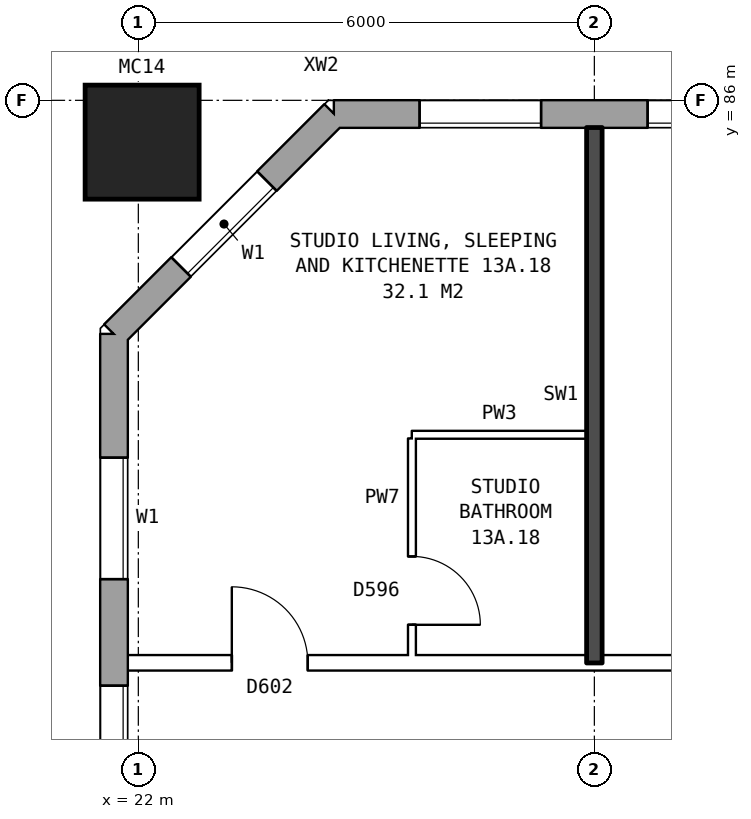
"""IFC4 building model, lengths in metres.
Left out: names, types, materials, properties, quantities, classifications, styles, units other than length and angle.
Written with IfcOpenShell. Run it as: python <this file> out.ifc"""

import sys

from ifc_helpers import new_model, si_unit, direction, frame, frame_2d, origin, origin_2d, place, context, subcontext, project, spatial, rectangle, hollow_rectangle, extrude, element, fill, save


model = new_model("IFC4")
c1 = context("Model", 3, precision=1e-05, world=origin(), true_north=direction((0.0, 1.0)))
c2 = subcontext(c1, "Body", "Model", "MODEL_VIEW")
j1 = project(units=[si_unit("LENGTHUNIT", "METRE"), si_unit("PLANEANGLEUNIT", "RADIAN")], contexts=[c1])
p1 = place(None, origin())
s1 = spatial("IfcSite", under=j1, at=p1, CompositionType="ELEMENT")
p2 = place(p1, origin())
s2 = spatial("IfcBuilding", under=s1, at=p2, CompositionType="ELEMENT")
p3 = place(p2, frame((0.0, 0.0, 50.5)))
s3 = spatial("IfcBuildingStorey", under=s2, at=p3, CompositionType="ELEMENT", Elevation=50.5)
p4 = place(p3, frame((22.05, 85.45, 0.0), z_axis=(0.0, 0.0, 1.0), x_axis=(1.0, 0.0, 0.0)))
e1 = element("IfcColumn", 1, at=p4, inside=s3, PredefinedType="COLUMN", context=c2, shape_type="SweptSolid", body=[
    extrude(hollow_rectangle(XDim=1.5, YDim=1.5, WallThickness=0.08, at=origin_2d()), origin(), (0.0, 0.0, 1.0), 3.1),
])
p5 = place(p3, frame((72.925, 85.82, 0.0), z_axis=(0.0, 0.0, 1.0), x_axis=(-1.0, 0.0, 0.0)))
e2 = element("IfcWall", 2, at=p5, inside=s3, PredefinedType="STANDARD", context=c2, shape_type="SweptSolid", body=[
    extrude(rectangle(XDim=48.351, YDim=0.36, at=frame_2d((24.175, 0.0))), origin(), (0.0, 0.0, 1.0), 2.85),
])
p6 = place(p5, frame((0.625, 0.0, 0.8)))
e3 = element("IfcOpeningElement", 3, at=p6, cuts=e2, PredefinedType="OPENING", context=c2, shape_type="SweptSolid", body=[
    extrude(rectangle(XDim=1.6, YDim=1.8, at=frame_2d((0.8, 0.9))), frame((0.0, 0.19, 0.0), z_axis=(0.0, -1.0, 0.0), x_axis=(1.0, 0.0, 0.0)), (0.0, 0.0, 1.0), 0.38),
])
p7 = place(p5, frame((3.625, 0.0, 0.8)))
e4 = element("IfcOpeningElement", 4, at=p7, cuts=e2, PredefinedType="OPENING", context=c2, shape_type="SweptSolid", body=[
    extrude(rectangle(XDim=1.6, YDim=1.8, at=frame_2d((0.8, 0.9))), frame((0.0, 0.19, 0.0), z_axis=(0.0, -1.0, 0.0), x_axis=(1.0, 0.0, 0.0)), (0.0, 0.0, 1.0), 0.38),
])
p8 = place(p5, frame((5.525, 0.0, 0.8)))
e5 = element("IfcOpeningElement", 5, at=p8, cuts=e2, PredefinedType="OPENING", context=c2, shape_type="SweptSolid", body=[
    extrude(rectangle(XDim=1.4, YDim=1.8, at=frame_2d((0.7, 0.9))), frame((0.0, 0.19, 0.0), z_axis=(0.0, -1.0, 0.0), x_axis=(1.0, 0.0, 0.0)), (0.0, 0.0, 1.0), 0.38),
])
p9 = place(p5, frame((9.225, 0.0, 0.45)))
e6 = element("IfcOpeningElement", 6, at=p9, cuts=e2, PredefinedType="OPENING", context=c2, shape_type="SweptSolid", body=[
    extrude(rectangle(XDim=1.0, YDim=0.9, at=frame_2d((0.5, 0.45))), frame((0.0, 0.19, 0.0), z_axis=(0.0, -1.0, 0.0), x_axis=(1.0, 0.0, 0.0)), (0.0, 0.0, 1.0), 0.38),
])
p10 = place(p5, frame((12.625, 0.0, 0.8)))
e7 = element("IfcOpeningElement", 7, at=p10, cuts=e2, PredefinedType="OPENING", context=c2, shape_type="SweptSolid", body=[
    extrude(rectangle(XDim=1.6, YDim=1.8, at=frame_2d((0.8, 0.9))), frame((0.0, 0.19, 0.0), z_axis=(0.0, -1.0, 0.0), x_axis=(1.0, 0.0, 0.0)), (0.0, 0.0, 1.0), 0.38),
])
p11 = place(p5, frame((15.625, 0.0, 0.8)))
e8 = element("IfcOpeningElement", 8, at=p11, cuts=e2, PredefinedType="OPENING", context=c2, shape_type="SweptSolid", body=[
    extrude(rectangle(XDim=1.6, YDim=1.8, at=frame_2d((0.8, 0.9))), frame((0.0, 0.19, 0.0), z_axis=(0.0, -1.0, 0.0), x_axis=(1.0, 0.0, 0.0)), (0.0, 0.0, 1.0), 0.38),
])
p12 = place(p5, frame((18.625, 0.0, 0.8)))
e9 = element("IfcOpeningElement", 9, at=p12, cuts=e2, PredefinedType="OPENING", context=c2, shape_type="SweptSolid", body=[
    extrude(rectangle(XDim=1.6, YDim=1.8, at=frame_2d((0.8, 0.9))), frame((0.0, 0.19, 0.0), z_axis=(0.0, -1.0, 0.0), x_axis=(1.0, 0.0, 0.0)), (0.0, 0.0, 1.0), 0.38),
])
p13 = place(p5, frame((21.625, 0.0, 0.8)))
e10 = element("IfcOpeningElement", 10, at=p13, cuts=e2, PredefinedType="OPENING", context=c2, shape_type="SweptSolid", body=[
    extrude(rectangle(XDim=1.6, YDim=1.8, at=frame_2d((0.8, 0.9))), frame((0.0, 0.19, 0.0), z_axis=(0.0, -1.0, 0.0), x_axis=(1.0, 0.0, 0.0)), (0.0, 0.0, 1.0), 0.38),
])
p14 = place(p5, frame((24.625, 0.0, 0.8)))
e11 = element("IfcOpeningElement", 11, at=p14, cuts=e2, PredefinedType="OPENING", context=c2, shape_type="SweptSolid", body=[
    extrude(rectangle(XDim=1.6, YDim=1.8, at=frame_2d((0.8, 0.9))), frame((0.0, 0.19, 0.0), z_axis=(0.0, -1.0, 0.0), x_axis=(1.0, 0.0, 0.0)), (0.0, 0.0, 1.0), 0.38),
])
p15 = place(p5, frame((27.625, 0.0, 0.8)))
e12 = element("IfcOpeningElement", 12, at=p15, cuts=e2, PredefinedType="OPENING", context=c2, shape_type="SweptSolid", body=[
    extrude(rectangle(XDim=1.6, YDim=1.8, at=frame_2d((0.8, 0.9))), frame((0.0, 0.19, 0.0), z_axis=(0.0, -1.0, 0.0), x_axis=(1.0, 0.0, 0.0)), (0.0, 0.0, 1.0), 0.38),
])
p16 = place(p5, frame((30.625, 0.0, 0.8)))
e13 = element("IfcOpeningElement", 13, at=p16, cuts=e2, PredefinedType="OPENING", context=c2, shape_type="SweptSolid", body=[
    extrude(rectangle(XDim=1.6, YDim=1.8, at=frame_2d((0.8, 0.9))), frame((0.0, 0.19, 0.0), z_axis=(0.0, -1.0, 0.0), x_axis=(1.0, 0.0, 0.0)), (0.0, 0.0, 1.0), 0.38),
])
p17 = place(p5, frame((33.625, 0.0, 0.8)))
e14 = element("IfcOpeningElement", 14, at=p17, cuts=e2, PredefinedType="OPENING", context=c2, shape_type="SweptSolid", body=[
    extrude(rectangle(XDim=1.6, YDim=1.8, at=frame_2d((0.8, 0.9))), frame((0.0, 0.19, 0.0), z_axis=(0.0, -1.0, 0.0), x_axis=(1.0, 0.0, 0.0)), (0.0, 0.0, 1.0), 0.38),
])
p18 = place(p5, frame((36.125, 0.0, 0.8)))
e15 = element("IfcOpeningElement", 15, at=p18, cuts=e2, PredefinedType="OPENING", context=c2, shape_type="SweptSolid", body=[
    extrude(rectangle(XDim=1.0, YDim=1.8, at=frame_2d((0.5, 0.9))), frame((0.0, 0.19, 0.0), z_axis=(0.0, -1.0, 0.0), x_axis=(1.0, 0.0, 0.0)), (0.0, 0.0, 1.0), 0.38),
])
p19 = place(p5, frame((39.975, 0.0, 1.7)))
e16 = element("IfcOpeningElement", 16, at=p19, cuts=e2, PredefinedType="OPENING", context=c2, shape_type="SweptSolid", body=[
    extrude(rectangle(XDim=1.0, YDim=0.9, at=frame_2d((0.5, 0.45))), frame((0.0, 0.19, 0.0), z_axis=(0.0, -1.0, 0.0), x_axis=(1.0, 0.0, 0.0)), (0.0, 0.0, 1.0), 0.38),
])
p20 = place(p5, frame((42.625, 0.0, 0.8)))
e17 = element("IfcOpeningElement", 17, at=p20, cuts=e2, PredefinedType="OPENING", context=c2, shape_type="SweptSolid", body=[
    extrude(rectangle(XDim=1.6, YDim=1.8, at=frame_2d((0.8, 0.9))), frame((0.0, 0.19, 0.0), z_axis=(0.0, -1.0, 0.0), x_axis=(1.0, 0.0, 0.0)), (0.0, 0.0, 1.0), 0.38),
])
p21 = place(p5, frame((45.625, 0.0, 0.8)))
e18 = element("IfcOpeningElement", 18, at=p21, cuts=e2, PredefinedType="OPENING", context=c2, shape_type="SweptSolid", body=[
    extrude(rectangle(XDim=1.6, YDim=1.8, at=frame_2d((0.8, 0.9))), frame((0.0, 0.19, 0.0), z_axis=(0.0, -1.0, 0.0), x_axis=(1.0, 0.0, 0.0)), (0.0, 0.0, 1.0), 0.38),
])
p22 = place(p5, frame((7.225, 0.0, 1.6)))
e19 = element("IfcOpeningElement", 19, at=p22, cuts=e2, PredefinedType="OPENING", context=c2, shape_type="SweptSolid", body=[
    extrude(rectangle(XDim=1.0, YDim=0.9, at=frame_2d((0.5, 0.45))), frame((0.0, 0.19, 0.0), z_axis=(0.0, -1.0, 0.0), x_axis=(1.0, 0.0, 0.0)), (0.0, 0.0, 1.0), 0.38),
])
p23 = place(p5, frame((10.575, 0.0, 0.45)))
e20 = element("IfcOpeningElement", 20, at=p23, cuts=e2, PredefinedType="OPENING", context=c2, shape_type="SweptSolid", body=[
    extrude(rectangle(XDim=1.2, YDim=1.8, at=frame_2d((0.6, 0.9))), frame((0.0, 0.19, 0.0), z_axis=(0.0, -1.0, 0.0), x_axis=(1.0, 0.0, 0.0)), (0.0, 0.0, 1.0), 0.38),
])
p24 = place(p5, frame((37.425, 0.0, 0.8)))
e21 = element("IfcOpeningElement", 21, at=p24, cuts=e2, PredefinedType="OPENING", context=c2, shape_type="SweptSolid", body=[
    extrude(rectangle(XDim=1.0, YDim=0.9, at=frame_2d((0.5, 0.45))), frame((0.0, 0.19, 0.0), z_axis=(0.0, -1.0, 0.0), x_axis=(1.0, 0.0, 0.0)), (0.0, 0.0, 1.0), 0.38),
])
p25 = place(p5, frame((41.275, 0.0, 0.8)))
e22 = element("IfcOpeningElement", 22, at=p25, cuts=e2, PredefinedType="OPENING", context=c2, shape_type="SweptSolid", body=[
    extrude(rectangle(XDim=1.0, YDim=1.8, at=frame_2d((0.5, 0.9))), frame((0.0, 0.19, 0.0), z_axis=(0.0, -1.0, 0.0), x_axis=(1.0, 0.0, 0.0)), (0.0, 0.0, 1.0), 0.38),
])
p26 = place(p3, frame((24.575, 85.82, 0.0), z_axis=(0.0, 0.0, 1.0), x_axis=(-0.707106781187, -0.707106781187, 0.0)))
e23 = element("IfcWall", 23, at=p26, inside=s3, PredefinedType="STANDARD", context=c2, shape_type="SweptSolid", body=[
    extrude(rectangle(XDim=4.094, YDim=0.36, at=frame_2d((2.047, 0.0))), origin(), (0.0, 0.0, 1.0), 2.85),
])
p27 = place(p26, frame((1.247, 0.0, 0.8)))
e24 = element("IfcOpeningElement", 24, at=p27, cuts=e23, PredefinedType="OPENING", context=c2, shape_type="SweptSolid", body=[
    extrude(rectangle(XDim=1.6, YDim=1.8, at=frame_2d((0.8, 0.9))), frame((0.0, 0.19, 0.0), z_axis=(0.0, -1.0, 0.0), x_axis=(1.0, 0.0, 0.0)), (0.0, 0.0, 1.0), 0.38),
])
p28 = place(p3, frame((21.68, 82.925, 0.0), z_axis=(0.0, 0.0, 1.0), x_axis=(0.0, -1.0, 0.0)))
e25 = element("IfcWall", 25, at=p28, inside=s3, PredefinedType="STANDARD", context=c2, shape_type="SweptSolid", body=[
    extrude(rectangle(XDim=25.851, YDim=0.36, at=frame_2d((12.925, 0.0))), origin(), (0.0, 0.0, 1.0), 2.85),
])
p29 = place(p28, frame((1.625, 0.0, 0.8)))
e26 = element("IfcOpeningElement", 26, at=p29, cuts=e25, PredefinedType="OPENING", context=c2, shape_type="SweptSolid", body=[
    extrude(rectangle(XDim=1.6, YDim=1.8, at=frame_2d((0.8, 0.9))), frame((0.0, 0.19, 0.0), z_axis=(0.0, -1.0, 0.0), x_axis=(1.0, 0.0, 0.0)), (0.0, 0.0, 1.0), 0.38),
])
p30 = place(p28, frame((4.625, 0.0, 0.8)))
e27 = element("IfcOpeningElement", 27, at=p30, cuts=e25, PredefinedType="OPENING", context=c2, shape_type="SweptSolid", body=[
    extrude(rectangle(XDim=1.6, YDim=1.8, at=frame_2d((0.8, 0.9))), frame((0.0, 0.19, 0.0), z_axis=(0.0, -1.0, 0.0), x_axis=(1.0, 0.0, 0.0)), (0.0, 0.0, 1.0), 0.38),
])
p31 = place(p28, frame((6.525, 0.0, 0.8)))
e28 = element("IfcOpeningElement", 28, at=p31, cuts=e25, PredefinedType="OPENING", context=c2, shape_type="SweptSolid", body=[
    extrude(rectangle(XDim=1.6, YDim=1.8, at=frame_2d((0.8, 0.9))), frame((0.0, 0.19, 0.0), z_axis=(0.0, -1.0, 0.0), x_axis=(1.0, 0.0, 0.0)), (0.0, 0.0, 1.0), 0.38),
])
p32 = place(p28, frame((8.425, 0.0, 1.1)))
e29 = element("IfcOpeningElement", 29, at=p32, cuts=e25, PredefinedType="OPENING", context=c2, shape_type="SweptSolid", body=[
    extrude(rectangle(XDim=0.8, YDim=1.5, at=frame_2d((0.4, 0.75))), frame((0.0, 0.19, 0.0), z_axis=(0.0, -1.0, 0.0), x_axis=(1.0, 0.0, 0.0)), (0.0, 0.0, 1.0), 0.38),
])
p33 = place(p28, frame((9.525, 0.0, 1.6)))
e30 = element("IfcOpeningElement", 30, at=p33, cuts=e25, PredefinedType="OPENING", context=c2, shape_type="SweptSolid", body=[
    extrude(rectangle(XDim=0.6, YDim=0.9, at=frame_2d((0.3, 0.45))), frame((0.0, 0.19, 0.0), z_axis=(0.0, -1.0, 0.0), x_axis=(1.0, 0.0, 0.0)), (0.0, 0.0, 1.0), 0.38),
])
p34 = place(p28, frame((11.475, 0.0, 0.8)))
e31 = element("IfcOpeningElement", 31, at=p34, cuts=e25, PredefinedType="OPENING", context=c2, shape_type="SweptSolid", body=[
    extrude(rectangle(XDim=0.6, YDim=0.9, at=frame_2d((0.3, 0.45))), frame((0.0, 0.19, 0.0), z_axis=(0.0, -1.0, 0.0), x_axis=(1.0, 0.0, 0.0)), (0.0, 0.0, 1.0), 0.38),
])
p35 = place(p28, frame((19.625, 0.0, 0.8)))
e32 = element("IfcOpeningElement", 32, at=p35, cuts=e25, PredefinedType="OPENING", context=c2, shape_type="SweptSolid", body=[
    extrude(rectangle(XDim=1.6, YDim=1.8, at=frame_2d((0.8, 0.9))), frame((0.0, 0.19, 0.0), z_axis=(0.0, -1.0, 0.0), x_axis=(1.0, 0.0, 0.0)), (0.0, 0.0, 1.0), 0.38),
])
p36 = place(p28, frame((22.625, 0.0, 0.8)))
e33 = element("IfcOpeningElement", 33, at=p36, cuts=e25, PredefinedType="OPENING", context=c2, shape_type="SweptSolid", body=[
    extrude(rectangle(XDim=1.6, YDim=1.8, at=frame_2d((0.8, 0.9))), frame((0.0, 0.19, 0.0), z_axis=(0.0, -1.0, 0.0), x_axis=(1.0, 0.0, 0.0)), (0.0, 0.0, 1.0), 0.38),
])
p37 = place(p28, frame((12.375, 0.0, 0.8)))
e34 = element("IfcOpeningElement", 34, at=p37, cuts=e25, PredefinedType="OPENING", context=c2, shape_type="SweptSolid", body=[
    extrude(rectangle(XDim=1.0, YDim=1.8, at=frame_2d((0.5, 0.9))), frame((0.0, 0.19, 0.0), z_axis=(0.0, -1.0, 0.0), x_axis=(1.0, 0.0, 0.0)), (0.0, 0.0, 1.0), 0.38),
])
p38 = place(p28, frame((13.675, 0.0, 0.8)))
e35 = element("IfcOpeningElement", 35, at=p38, cuts=e25, PredefinedType="OPENING", context=c2, shape_type="SweptSolid", body=[
    extrude(rectangle(XDim=0.6, YDim=0.9, at=frame_2d((0.3, 0.45))), frame((0.0, 0.19, 0.0), z_axis=(0.0, -1.0, 0.0), x_axis=(1.0, 0.0, 0.0)), (0.0, 0.0, 1.0), 0.38),
])
p39 = place(p28, frame((15.575, 0.0, 1.7)))
e36 = element("IfcOpeningElement", 36, at=p39, cuts=e25, PredefinedType="OPENING", context=c2, shape_type="SweptSolid", body=[
    extrude(rectangle(XDim=0.6, YDim=0.9, at=frame_2d((0.3, 0.45))), frame((0.0, 0.19, 0.0), z_axis=(0.0, -1.0, 0.0), x_axis=(1.0, 0.0, 0.0)), (0.0, 0.0, 1.0), 0.38),
])
p40 = place(p28, frame((16.575, 0.0, 1.1)))
e37 = element("IfcOpeningElement", 37, at=p40, cuts=e25, PredefinedType="OPENING", context=c2, shape_type="SweptSolid", body=[
    extrude(rectangle(XDim=0.8, YDim=1.5, at=frame_2d((0.4, 0.75))), frame((0.0, 0.19, 0.0), z_axis=(0.0, -1.0, 0.0), x_axis=(1.0, 0.0, 0.0)), (0.0, 0.0, 1.0), 0.38),
])
p41 = place(p28, frame((17.675, 0.0, 0.8)))
e38 = element("IfcOpeningElement", 38, at=p41, cuts=e25, PredefinedType="OPENING", context=c2, shape_type="SweptSolid", body=[
    extrude(rectangle(XDim=1.6, YDim=1.8, at=frame_2d((0.8, 0.9))), frame((0.0, 0.19, 0.0), z_axis=(0.0, -1.0, 0.0), x_axis=(1.0, 0.0, 0.0)), (0.0, 0.0, 1.0), 0.38),
])
p42 = place(p3, frame((21.86, 78.6, 0.0), z_axis=(0.0, 0.0, 1.0), x_axis=(1.0, 0.0, 0.0)))
e39 = element("IfcWall", 39, at=p42, inside=s3, PredefinedType="PARTITIONING", context=c2, shape_type="SweptSolid", body=[
    extrude(rectangle(XDim=24.04, YDim=0.2, at=frame_2d((12.02, 0.0))), origin(), (0.0, 0.0, 1.0), 2.85),
])
p43 = place(p42, frame((20.59, 0.0, 0.0)))
e40 = element("IfcOpeningElement", 40, at=p43, cuts=e39, PredefinedType="OPENING", context=c2, shape_type="SweptSolid", body=[
    extrude(rectangle(XDim=1.0, YDim=2.1, at=frame_2d((0.5, 1.05))), frame((0.0, 0.11, 0.0), z_axis=(0.0, -1.0, 0.0), x_axis=(1.0, 0.0, 0.0)), (0.0, 0.0, 1.0), 0.22),
])
p44 = place(p42, frame((8.64, 0.0, 0.0)))
e41 = element("IfcOpeningElement", 41, at=p44, cuts=e39, PredefinedType="OPENING", context=c2, shape_type="SweptSolid", body=[
    extrude(rectangle(XDim=1.0, YDim=2.1, at=frame_2d((0.5, 1.05))), frame((0.0, 0.11, 0.0), z_axis=(0.0, -1.0, 0.0), x_axis=(1.0, 0.0, 0.0)), (0.0, 0.0, 1.0), 0.22),
])
p45 = place(p42, frame((1.37, 0.0, 0.0)))
e42 = element("IfcOpeningElement", 42, at=p45, cuts=e39, PredefinedType="OPENING", context=c2, shape_type="SweptSolid", body=[
    extrude(rectangle(XDim=1.0, YDim=2.1, at=frame_2d((0.5, 1.05))), frame((0.0, 0.11, 0.0), z_axis=(0.0, -1.0, 0.0), x_axis=(1.0, 0.0, 0.0)), (0.0, 0.0, 1.0), 0.22),
])
p46 = place(p3, frame((25.6, 81.6, 0.0), z_axis=(0.0, 0.0, 1.0), x_axis=(1.0, 0.0, 0.0)))
e43 = element("IfcWall", 43, at=p46, inside=s3, PredefinedType="PARTITIONING", context=c2, shape_type="SweptSolid", body=[
    extrude(rectangle(XDim=2.3, YDim=0.1, at=frame_2d((1.15, 0.0))), origin(), (0.0, 0.0, 1.0), 2.85),
])
p47 = place(p3, frame((25.6, 78.7, 0.0), z_axis=(0.0, 0.0, 1.0), x_axis=(0.0, 1.0, 0.0)))
e44 = element("IfcWall", 44, at=p47, inside=s3, PredefinedType="PARTITIONING", context=c2, shape_type="SweptSolid", body=[
    extrude(rectangle(XDim=2.85, YDim=0.1, at=frame_2d((1.425, 0.0))), origin(), (0.0, 0.0, 1.0), 2.85),
])
p48 = place(p47, frame((0.4, 0.0, 0.0)))
e45 = element("IfcOpeningElement", 45, at=p48, cuts=e44, PredefinedType="OPENING", context=c2, shape_type="SweptSolid", body=[
    extrude(rectangle(XDim=0.9, YDim=2.1, at=frame_2d((0.45, 1.05))), frame((0.0, 0.06, 0.0), z_axis=(0.0, -1.0, 0.0), x_axis=(1.0, 0.0, 0.0)), (0.0, 0.0, 1.0), 0.12),
])
p49 = place(p3, frame((28.0, 78.6, 0.0), z_axis=(0.0, 0.0, 1.0), x_axis=(0.0, 1.0, 0.0)))
e46 = element("IfcWall", 46, at=p49, inside=s3, PredefinedType="SOLIDWALL", context=c2, shape_type="SweptSolid", body=[
    extrude(rectangle(XDim=7.04, YDim=0.2, at=frame_2d((3.52, 0.0))), origin(), (0.0, 0.0, 1.0), 2.85),
])
p50 = place(p20, origin())
e47 = element("IfcWindow", 47, at=p50, inside=s3, PartitioningType="SINGLE_PANEL", PredefinedType="WINDOW", context=c2, shape_type="SweptSolid", body=[
    extrude(rectangle(XDim=1.6, YDim=1.8, at=frame_2d((0.8, 0.9))), frame((0.0, 0.15, 0.0), z_axis=(0.0, -1.0, 0.0), x_axis=(1.0, 0.0, 0.0)), (0.0, 0.0, 1.0), 0.06),
])
fill(e17, e47)
p51 = place(p21, origin())
e48 = element("IfcWindow", 48, at=p51, inside=s3, PartitioningType="SINGLE_PANEL", PredefinedType="WINDOW", context=c2, shape_type="SweptSolid", body=[
    extrude(rectangle(XDim=1.6, YDim=1.8, at=frame_2d((0.8, 0.9))), frame((0.0, 0.15, 0.0), z_axis=(0.0, -1.0, 0.0), x_axis=(1.0, 0.0, 0.0)), (0.0, 0.0, 1.0), 0.06),
])
fill(e18, e48)
p52 = place(p27, origin())
e49 = element("IfcWindow", 49, at=p52, inside=s3, PartitioningType="SINGLE_PANEL", PredefinedType="WINDOW", context=c2, shape_type="SweptSolid", body=[
    extrude(rectangle(XDim=1.6, YDim=1.8, at=frame_2d((0.8, 0.9))), frame((0.0, 0.15, 0.0), z_axis=(0.0, -1.0, 0.0), x_axis=(1.0, 0.0, 0.0)), (0.0, 0.0, 1.0), 0.06),
])
fill(e24, e49)
p53 = place(p29, origin())
e50 = element("IfcWindow", 50, at=p53, inside=s3, PartitioningType="SINGLE_PANEL", PredefinedType="WINDOW", context=c2, shape_type="SweptSolid", body=[
    extrude(rectangle(XDim=1.6, YDim=1.8, at=frame_2d((0.8, 0.9))), frame((0.0, 0.15, 0.0), z_axis=(0.0, -1.0, 0.0), x_axis=(1.0, 0.0, 0.0)), (0.0, 0.0, 1.0), 0.06),
])
fill(e26, e50)
p54 = place(p30, origin())
e51 = element("IfcWindow", 51, at=p54, inside=s3, PartitioningType="SINGLE_PANEL", PredefinedType="WINDOW", context=c2, shape_type="SweptSolid", body=[
    extrude(rectangle(XDim=1.6, YDim=1.8, at=frame_2d((0.8, 0.9))), frame((0.0, 0.15, 0.0), z_axis=(0.0, -1.0, 0.0), x_axis=(1.0, 0.0, 0.0)), (0.0, 0.0, 1.0), 0.06),
])
fill(e27, e51)
p55 = place(p45, origin())
e52 = element("IfcDoor", 52, at=p55, inside=s3, OperationType="SINGLE_SWING_LEFT", PredefinedType="DOOR", context=c2, shape_type="SweptSolid", body=[
    extrude(rectangle(XDim=1.0, YDim=2.1, at=frame_2d((0.5, 1.05))), frame((0.0, 0.025, 0.0), z_axis=(0.0, -1.0, 0.0), x_axis=(1.0, 0.0, 0.0)), (0.0, 0.0, 1.0), 0.05),
])
fill(e42, e52)
p56 = place(p48, frame((0.9, 0.0, 0.0), z_axis=(0.0, 0.0, 1.0), x_axis=(-1.0, 0.0, 0.0)))
e53 = element("IfcDoor", 53, at=p56, inside=s3, OperationType="SINGLE_SWING_RIGHT", PredefinedType="DOOR", context=c2, shape_type="SweptSolid", body=[
    extrude(rectangle(XDim=0.9, YDim=2.1, at=frame_2d((0.45, 1.05))), frame((0.0, 0.025, 0.0), z_axis=(0.0, -1.0, 0.0), x_axis=(1.0, 0.0, 0.0)), (0.0, 0.0, 1.0), 0.05),
])
fill(e45, e53)
save(model, sys.argv[1])
